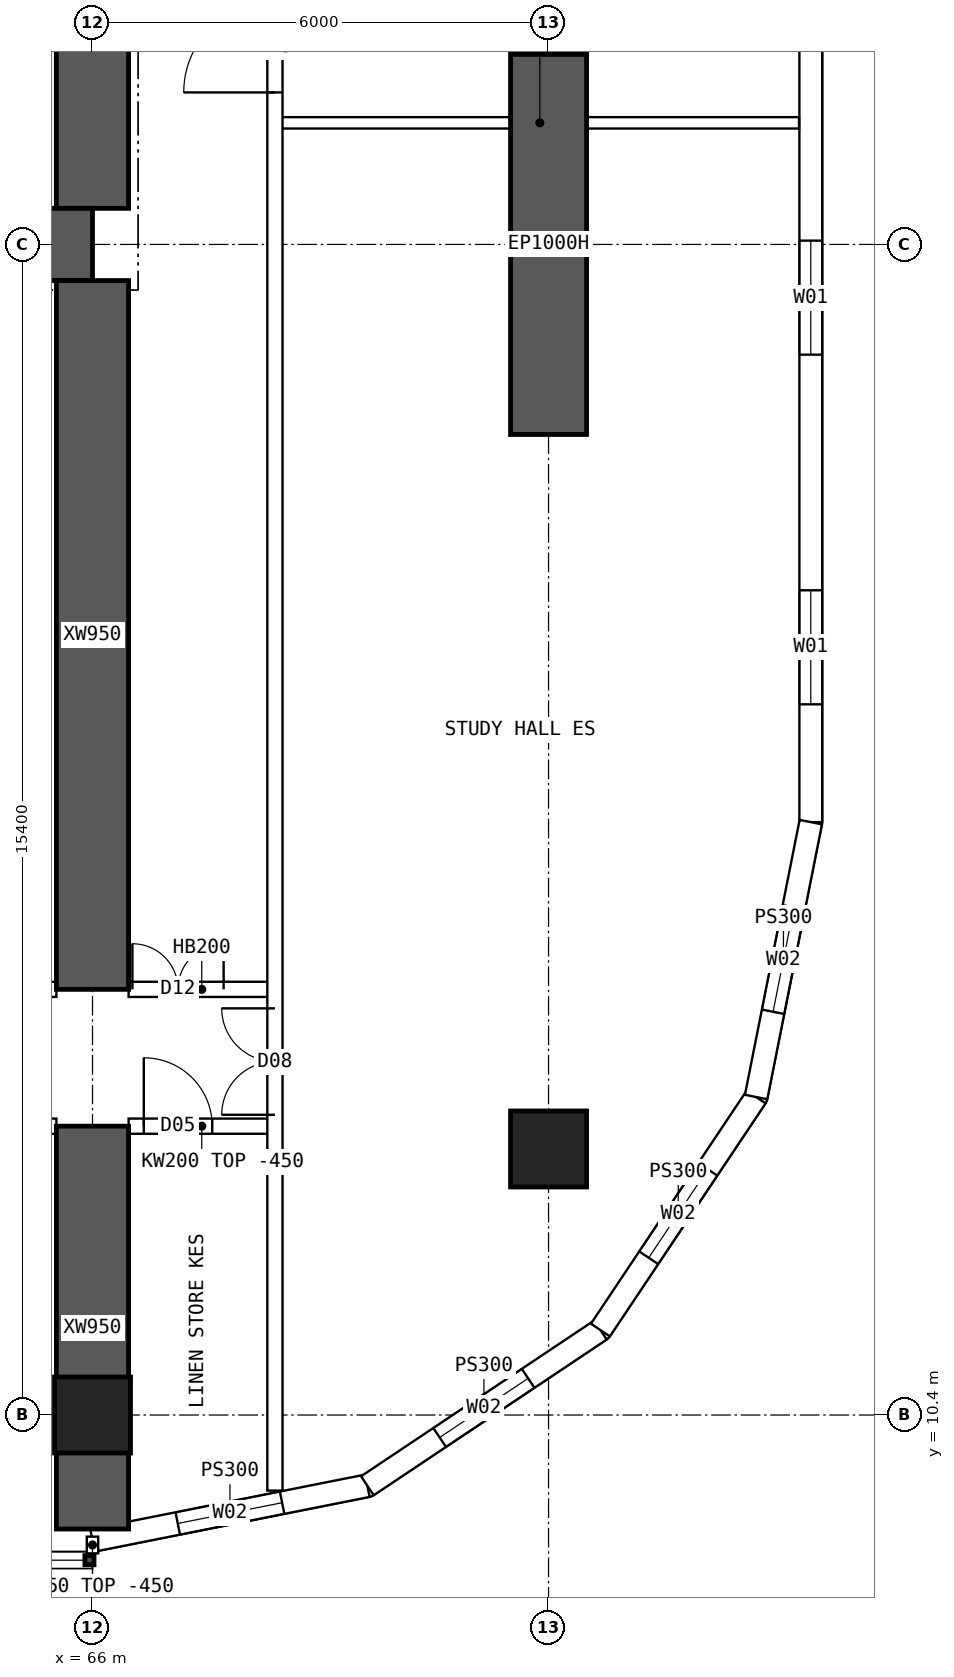
"""IFC4 building model, lengths in metres.
Left out: names, types, materials, properties, quantities, classifications, styles, units other than length and angle.
Written with IfcOpenShell. Run it as: python <this file> out.ifc"""

import sys

from ifc_helpers import new_model, si_unit, direction, frame, frame_2d, origin, origin_2d, place, context, subcontext, project, spatial, polyline, rectangle, hollow_rectangle, outline, extrude, element, fill, save


model = new_model("IFC4")
c1 = context("Model", 3, precision=1e-05, world=origin(), true_north=direction((0.0, 1.0)))
c2 = subcontext(c1, "Body", "Model", "MODEL_VIEW")
j1 = project(units=[si_unit("LENGTHUNIT", "METRE"), si_unit("PLANEANGLEUNIT", "RADIAN")], contexts=[c1])
p1 = place(None, origin())
s1 = spatial("IfcSite", under=j1, at=p1, CompositionType="ELEMENT")
p2 = place(p1, origin())
s2 = spatial("IfcBuilding", under=s1, at=p2, CompositionType="ELEMENT")
p3 = place(p2, frame((0.0, 0.0, 95.65)))
s3 = spatial("IfcBuildingStorey", under=s2, at=p3, CompositionType="ELEMENT", Elevation=95.65)
for number, where, z_axis, x_axis in (
    (1, (66.0, 10.4, 0.0), (0.0, 0.0, 1.0), (1.0, 0.0, 0.0)),
    (2, (72.0, 13.9, 0.0), (0.0, 0.0, 1.0), (1.0, 0.0, 0.0)),
):
    element("IfcColumn", number, at=place(p3, frame(where, z_axis=z_axis, x_axis=x_axis)), inside=s3, PredefinedType="COLUMN", context=c2, shape_type="SweptSolid", body=[
        extrude(hollow_rectangle(XDim=1.0, YDim=1.0, WallThickness=0.1, at=origin_2d()), origin(), (0.0, 0.0, 1.0), 3.75),
    ])
p4 = place(p3, frame((72.0, 23.3, 0.0), z_axis=(0.0, 0.0, 1.0), x_axis=(0.0, 1.0, 0.0)))
e3 = element("IfcWall", 3, at=p4, inside=s3, PredefinedType="SHEAR", context=c2, shape_type="SweptSolid", body=[
    extrude(rectangle(XDim=5.0, YDim=1.0, at=frame_2d((2.5, 0.0))), origin(), (0.0, 0.0, 1.0), 3.75),
])
p5 = place(p3, frame((18.0, 25.8, 0.0), z_axis=(0.0, 0.0, 1.0), x_axis=(1.0, 0.0, 0.0)))
e4 = element("IfcWall", 4, at=p5, inside=s3, PredefinedType="SHEAR", context=c2, shape_type="SweptSolid", body=[
    extrude(rectangle(XDim=48.0, YDim=0.95, at=frame_2d((24.0, 0.0))), origin(), (0.0, 0.0, 1.0), 3.75),
])
p6 = place(p3, frame((66.0, 26.275, 0.0), z_axis=(0.0, 0.0, 1.0), x_axis=(0.0, 1.0, 0.0)))
e5 = element("IfcWall", 5, at=p6, inside=s3, PredefinedType="SHEAR", context=c2, shape_type="SweptSolid", body=[
    extrude(rectangle(XDim=11.45, YDim=0.95, at=frame_2d((5.725, 0.0))), origin(), (0.0, 0.0, 1.0), 3.75),
])
p7 = place(p6, frame((5.025, 0.0, 0.0)))
e6 = element("IfcOpeningElement", 6, at=p7, cuts=e5, PredefinedType="OPENING", context=c2, shape_type="SweptSolid", body=[
    extrude(rectangle(XDim=1.2, YDim=2.1, at=frame_2d((0.6, 1.05))), frame((0.0, 0.485, 0.0), z_axis=(0.0, -1.0, 0.0), x_axis=(1.0, 0.0, 0.0)), (0.0, 0.0, 1.0), 0.97),
])
p8 = place(p3, frame((66.0, 8.9, 0.0), z_axis=(0.0, 0.0, 1.0), x_axis=(0.0, 1.0, 0.0)))
e7 = element("IfcWall", 7, at=p8, inside=s3, PredefinedType="SHEAR", context=c2, shape_type="SweptSolid", body=[
    extrude(rectangle(XDim=5.3, YDim=0.95, at=frame_2d((2.65, 0.0))), origin(), (0.0, 0.0, 1.0), 3.75),
])
p9 = place(p3, frame((66.0, 16.0, 0.0), z_axis=(0.0, 0.0, 1.0), x_axis=(0.0, 1.0, 0.0)))
e8 = element("IfcWall", 8, at=p9, inside=s3, PredefinedType="SHEAR", context=c2, shape_type="SweptSolid", body=[
    extrude(rectangle(XDim=9.325, YDim=0.95, at=frame_2d((4.663, 0.0))), origin(), (0.0, 0.0, 1.0), 3.75),
])
p10 = place(p3, frame((75.45, 18.2, 0.0), z_axis=(0.0, 0.0, 1.0), x_axis=(0.0, 1.0, 0.0)))
e9 = element("IfcWall", 9, at=p10, inside=s3, PredefinedType="SOLIDWALL", context=c2, shape_type="SweptSolid", body=[
    extrude(outline(polyline([(-0.015, -0.15), (27.615, -0.15), (27.585, 0.15), (0.015, 0.15), (-0.015, -0.15)])), origin(), (0.0, 0.0, 1.0), 3.3),
])
p11 = place(p10, frame((1.55, 0.0, 0.9)))
e10 = element("IfcOpeningElement", 10, at=p11, cuts=e9, PredefinedType="OPENING", context=c2, shape_type="SweptSolid", body=[
    extrude(rectangle(XDim=1.5, YDim=2.0, at=frame_2d((0.75, 1.0))), frame((0.0, 0.16, 0.0), z_axis=(0.0, -1.0, 0.0), x_axis=(1.0, 0.0, 0.0)), (0.0, 0.0, 1.0), 0.32),
])
p12 = place(p10, frame((6.15, 0.0, 0.9)))
e11 = element("IfcOpeningElement", 11, at=p12, cuts=e9, PredefinedType="OPENING", context=c2, shape_type="SweptSolid", body=[
    extrude(rectangle(XDim=1.5, YDim=2.0, at=frame_2d((0.75, 1.0))), frame((0.0, 0.16, 0.0), z_axis=(0.0, -1.0, 0.0), x_axis=(1.0, 0.0, 0.0)), (0.0, 0.0, 1.0), 0.32),
])
p13 = place(p10, frame((10.75, 0.0, 0.9)))
e12 = element("IfcOpeningElement", 12, at=p13, cuts=e9, PredefinedType="OPENING", context=c2, shape_type="SweptSolid", body=[
    extrude(rectangle(XDim=1.5, YDim=2.0, at=frame_2d((0.75, 1.0))), frame((0.0, 0.16, 0.0), z_axis=(0.0, -1.0, 0.0), x_axis=(1.0, 0.0, 0.0)), (0.0, 0.0, 1.0), 0.32),
])
p14 = place(p10, frame((15.35, 0.0, 0.9)))
e13 = element("IfcOpeningElement", 13, at=p14, cuts=e9, PredefinedType="OPENING", context=c2, shape_type="SweptSolid", body=[
    extrude(rectangle(XDim=1.5, YDim=2.0, at=frame_2d((0.75, 1.0))), frame((0.0, 0.16, 0.0), z_axis=(0.0, -1.0, 0.0), x_axis=(1.0, 0.0, 0.0)), (0.0, 0.0, 1.0), 0.32),
])
p15 = place(p10, frame((19.95, 0.0, 0.9)))
e14 = element("IfcOpeningElement", 14, at=p15, cuts=e9, PredefinedType="OPENING", context=c2, shape_type="SweptSolid", body=[
    extrude(rectangle(XDim=1.5, YDim=2.0, at=frame_2d((0.75, 1.0))), frame((0.0, 0.16, 0.0), z_axis=(0.0, -1.0, 0.0), x_axis=(1.0, 0.0, 0.0)), (0.0, 0.0, 1.0), 0.32),
])
p16 = place(p10, frame((24.55, 0.0, 0.9)))
e15 = element("IfcOpeningElement", 15, at=p16, cuts=e9, PredefinedType="OPENING", context=c2, shape_type="SweptSolid", body=[
    extrude(rectangle(XDim=1.5, YDim=2.0, at=frame_2d((0.75, 1.0))), frame((0.0, 0.16, 0.0), z_axis=(0.0, -1.0, 0.0), x_axis=(1.0, 0.0, 0.0)), (0.0, 0.0, 1.0), 0.32),
])
p17 = place(p3, frame((66.0, 8.75, 0.0), z_axis=(0.0, 0.0, 1.0), x_axis=(0.980791473772, 0.195059183267, 0.0)))
e16 = element("IfcWall", 16, at=p17, inside=s3, PredefinedType="SOLIDWALL", context=c2, shape_type="SweptSolid", body=[
    extrude(outline(polyline([(-0.03, -0.15), (3.717, -0.15), (3.657, 0.15), (0.03, 0.15), (-0.03, -0.15)])), origin(), (0.0, 0.0, 1.0), 3.3),
])
p18 = place(p17, frame((1.144, 0.0, 0.9)))
e17 = element("IfcOpeningElement", 17, at=p18, cuts=e16, PredefinedType="OPENING", context=c2, shape_type="SweptSolid", body=[
    extrude(rectangle(XDim=1.4, YDim=1.8, at=frame_2d((0.7, 0.9))), frame((0.0, 0.16, 0.0), z_axis=(0.0, -1.0, 0.0), x_axis=(1.0, 0.0, 0.0)), (0.0, 0.0, 1.0), 0.32),
])
p19 = place(p3, frame((69.616, 9.469, 0.0), z_axis=(0.0, 0.0, 1.0), x_axis=(0.831448786846, 0.555601399253, 0.0)))
e18 = element("IfcWall", 18, at=p19, inside=s3, PredefinedType="SOLIDWALL", context=c2, shape_type="SweptSolid", body=[
    extrude(outline(polyline([(-0.03, -0.15), (3.717, -0.15), (3.657, 0.15), (0.03, 0.15), (-0.03, -0.15)])), origin(), (0.0, 0.0, 1.0), 3.3),
])
p20 = place(p19, frame((1.144, 0.0, 0.9)))
e19 = element("IfcOpeningElement", 19, at=p20, cuts=e18, PredefinedType="OPENING", context=c2, shape_type="SweptSolid", body=[
    extrude(rectangle(XDim=1.4, YDim=1.8, at=frame_2d((0.7, 0.9))), frame((0.0, 0.16, 0.0), z_axis=(0.0, -1.0, 0.0), x_axis=(1.0, 0.0, 0.0)), (0.0, 0.0, 1.0), 0.32),
])
p21 = place(p3, frame((72.682, 11.518, 0.0), z_axis=(0.0, 0.0, 1.0), x_axis=(0.555601399253, 0.831448786846, 0.0)))
e20 = element("IfcWall", 20, at=p21, inside=s3, PredefinedType="SOLIDWALL", context=c2, shape_type="SweptSolid", body=[
    extrude(outline(polyline([(-0.03, -0.15), (3.717, -0.15), (3.657, 0.15), (0.03, 0.15), (-0.03, -0.15)])), origin(), (0.0, 0.0, 1.0), 3.3),
])
p22 = place(p21, frame((1.144, 0.0, 0.9)))
e21 = element("IfcOpeningElement", 21, at=p22, cuts=e20, PredefinedType="OPENING", context=c2, shape_type="SweptSolid", body=[
    extrude(rectangle(XDim=1.4, YDim=1.8, at=frame_2d((0.7, 0.9))), frame((0.0, 0.16, 0.0), z_axis=(0.0, -1.0, 0.0), x_axis=(1.0, 0.0, 0.0)), (0.0, 0.0, 1.0), 0.32),
])
p23 = place(p3, frame((74.731, 14.583, 0.0), z_axis=(0.0, 0.0, 1.0), x_axis=(0.195059183267, 0.980791473772, 0.0)))
e22 = element("IfcWall", 22, at=p23, inside=s3, PredefinedType="SOLIDWALL", context=c2, shape_type="SweptSolid", body=[
    extrude(outline(polyline([(-0.03, -0.15), (3.702, -0.15), (3.672, 0.15), (0.03, 0.15), (-0.03, -0.15)])), origin(), (0.0, 0.0, 1.0), 3.3),
])
p24 = place(p23, frame((1.144, 0.0, 0.9)))
e23 = element("IfcOpeningElement", 23, at=p24, cuts=e22, PredefinedType="OPENING", context=c2, shape_type="SweptSolid", body=[
    extrude(rectangle(XDim=1.4, YDim=1.8, at=frame_2d((0.7, 0.9))), frame((0.0, 0.16, 0.0), z_axis=(0.0, -1.0, 0.0), x_axis=(1.0, 0.0, 0.0)), (0.0, 0.0, 1.0), 0.32),
])
p25 = place(p3, frame((60.475, 14.2, 0.0), z_axis=(0.0, 0.0, 1.0), x_axis=(1.0, 0.0, 0.0)))
e24 = element("IfcWall", 24, at=p25, inside=s3, PredefinedType="SOLIDWALL", context=c2, shape_type="SweptSolid", body=[
    extrude(outline(polyline([(0.0, 0.0), (5.05, 0.0), (5.05, 2.9), (0.0, 2.9), (0.0, 0.0)])), frame((0.0, 0.1, 0.0), z_axis=(0.0, -1.0, 0.0), x_axis=(1.0, 0.0, 0.0)), (0.0, 0.0, 1.0), 0.2),
])
p26 = place(p25, frame((0.1, 0.0, 0.0)))
e25 = element("IfcOpeningElement", 25, at=p26, cuts=e24, PredefinedType="OPENING", context=c2, shape_type="SweptSolid", body=[
    extrude(rectangle(XDim=0.9, YDim=2.1, at=frame_2d((0.45, 1.05))), frame((0.0, 0.11, 0.0), z_axis=(0.0, -1.0, 0.0), x_axis=(1.0, 0.0, 0.0)), (0.0, 0.0, 1.0), 0.22),
])
p27 = place(p25, frame((4.05, 0.0, 0.0)))
e26 = element("IfcOpeningElement", 26, at=p27, cuts=e24, PredefinedType="OPENING", context=c2, shape_type="SweptSolid", body=[
    extrude(rectangle(XDim=0.9, YDim=2.1, at=frame_2d((0.45, 1.05))), frame((0.0, 0.11, 0.0), z_axis=(0.0, -1.0, 0.0), x_axis=(1.0, 0.0, 0.0)), (0.0, 0.0, 1.0), 0.22),
])
p28 = place(p3, frame((60.475, 16.0, 0.0), z_axis=(0.0, 0.0, 1.0), x_axis=(1.0, 0.0, 0.0)))
e27 = element("IfcWall", 27, at=p28, inside=s3, PredefinedType="SOLIDWALL", context=c2, shape_type="SweptSolid", body=[
    extrude(rectangle(XDim=5.05, YDim=0.2, at=frame_2d((2.525, 0.0))), origin(), (0.0, 0.0, 1.0), 3.3),
])
p29 = place(p28, frame((0.15, 0.0, 0.0)))
e28 = element("IfcOpeningElement", 28, at=p29, cuts=e27, PredefinedType="OPENING", context=c2, shape_type="SweptSolid", body=[
    extrude(rectangle(XDim=0.9, YDim=2.1, at=frame_2d((0.45, 1.05))), frame((0.0, 0.11, 0.0), z_axis=(0.0, -1.0, 0.0), x_axis=(1.0, 0.0, 0.0)), (0.0, 0.0, 1.0), 0.22),
])
p30 = place(p28, frame((3.185, 0.0, 0.0)))
e29 = element("IfcOpeningElement", 29, at=p30, cuts=e27, PredefinedType="OPENING", context=c2, shape_type="SweptSolid", body=[
    extrude(rectangle(XDim=0.9, YDim=2.1, at=frame_2d((0.45, 1.05))), frame((0.0, 0.11, 0.0), z_axis=(0.0, -1.0, 0.0), x_axis=(1.0, 0.0, 0.0)), (0.0, 0.0, 1.0), 0.22),
])
p31 = place(p3, frame((66.475, 14.2, 0.0), z_axis=(0.0, 0.0, 1.0), x_axis=(1.0, 0.0, 0.0)))
e30 = element("IfcWall", 30, at=p31, inside=s3, PredefinedType="SOLIDWALL", context=c2, shape_type="SweptSolid", body=[
    extrude(rectangle(XDim=1.925, YDim=0.2, at=frame_2d((0.962, 0.0))), origin(), (0.0, 0.0, 1.0), 3.3),
])
p32 = place(p31, frame((0.2, 0.0, 0.0)))
e31 = element("IfcOpeningElement", 31, at=p32, cuts=e30, PredefinedType="OPENING", context=c2, shape_type="SweptSolid", body=[
    extrude(rectangle(XDim=0.9, YDim=2.1, at=frame_2d((0.45, 1.05))), frame((0.0, 0.11, 0.0), z_axis=(0.0, -1.0, 0.0), x_axis=(1.0, 0.0, 0.0)), (0.0, 0.0, 1.0), 0.22),
])
p33 = place(p3, frame((66.475, 16.0, 0.0), z_axis=(0.0, 0.0, 1.0), x_axis=(1.0, 0.0, 0.0)))
e32 = element("IfcWall", 32, at=p33, inside=s3, PredefinedType="SOLIDWALL", context=c2, shape_type="SweptSolid", body=[
    extrude(rectangle(XDim=1.925, YDim=0.2, at=frame_2d((0.962, 0.0))), origin(), (0.0, 0.0, 1.0), 3.3),
])
p34 = place(p33, frame((0.05, 0.0, 0.0)))
e33 = element("IfcOpeningElement", 33, at=p34, cuts=e32, PredefinedType="OPENING", context=c2, shape_type="SweptSolid", body=[
    extrude(rectangle(XDim=1.2, YDim=2.1, at=frame_2d((0.6, 1.05))), frame((0.0, 0.11, 0.0), z_axis=(0.0, -1.0, 0.0), x_axis=(1.0, 0.0, 0.0)), (0.0, 0.0, 1.0), 0.22),
])
p35 = place(p3, frame((68.4, 9.405, 0.0), z_axis=(0.0, 0.0, 1.0), x_axis=(0.0, 1.0, 0.0)))
e34 = element("IfcWall", 34, at=p35, inside=s3, PredefinedType="SOLIDWALL", context=c2, shape_type="SweptSolid", body=[
    extrude(rectangle(XDim=45.189, YDim=0.2, at=frame_2d((22.595, 0.0))), origin(), (0.0, 0.0, 1.0), 3.3),
])
p36 = place(p35, frame((18.395, 0.0, 0.0)))
e35 = element("IfcOpeningElement", 35, at=p36, cuts=e34, PredefinedType="OPENING", context=c2, shape_type="SweptSolid", body=[
    extrude(rectangle(XDim=1.2, YDim=2.1, at=frame_2d((0.6, 1.05))), frame((0.0, 0.11, 0.0), z_axis=(0.0, -1.0, 0.0), x_axis=(1.0, 0.0, 0.0)), (0.0, 0.0, 1.0), 0.22),
])
p37 = place(p35, frame((30.195, 0.0, 0.0)))
e36 = element("IfcOpeningElement", 36, at=p37, cuts=e34, PredefinedType="OPENING", context=c2, shape_type="SweptSolid", body=[
    extrude(rectangle(XDim=1.2, YDim=2.1, at=frame_2d((0.6, 1.05))), frame((0.0, 0.11, 0.0), z_axis=(0.0, -1.0, 0.0), x_axis=(1.0, 0.0, 0.0)), (0.0, 0.0, 1.0), 0.22),
])
p38 = place(p35, frame((4.945, 0.0, 0.0)))
e37 = element("IfcOpeningElement", 37, at=p38, cuts=e34, PredefinedType="OPENING", context=c2, shape_type="SweptSolid", body=[
    extrude(rectangle(XDim=1.4, YDim=2.1, at=frame_2d((0.7, 1.05))), frame((0.0, 0.11, 0.0), z_axis=(0.0, -1.0, 0.0), x_axis=(1.0, 0.0, 0.0)), (0.0, 0.0, 1.0), 0.22),
])
p39 = place(p35, frame((38.745, 0.0, 0.0)))
e38 = element("IfcOpeningElement", 38, at=p39, cuts=e34, PredefinedType="OPENING", context=c2, shape_type="SweptSolid", body=[
    extrude(rectangle(XDim=1.4, YDim=2.1, at=frame_2d((0.7, 1.05))), frame((0.0, 0.11, 0.0), z_axis=(0.0, -1.0, 0.0), x_axis=(1.0, 0.0, 0.0)), (0.0, 0.0, 1.0), 0.22),
])
p40 = place(p3, frame((68.475, 27.4, 0.0), z_axis=(0.0, 0.0, 1.0), x_axis=(1.0, 0.0, 0.0)))
e39 = element("IfcWall", 39, at=p40, inside=s3, PredefinedType="PARTITIONING", context=c2, shape_type="SweptSolid", body=[
    extrude(rectangle(XDim=6.82, YDim=0.15, at=frame_2d((3.41, 0.0))), origin(), (0.0, 0.0, 1.0), 3.3),
])
p41 = place(p3, frame((66.0, 8.8, 0.0), z_axis=(0.0, 0.0, 1.0), x_axis=(0.0, -1.0, 0.0)))
e40 = element("IfcWall", 40, at=p41, inside=s3, PredefinedType="PARTITIONING", context=c2, shape_type="SweptSolid", body=[
    extrude(rectangle(XDim=0.22, YDim=0.15, at=frame_2d((0.11, 0.0))), origin(), (0.0, 0.0, 1.0), 3.3),
])
p42 = place(p11, origin())
e41 = element("IfcWindow", 41, at=p42, inside=s3, PartitioningType="SINGLE_PANEL", PredefinedType="WINDOW", context=c2, shape_type="SweptSolid", body=[
    extrude(rectangle(XDim=1.5, YDim=2.0, at=frame_2d((0.75, 1.0))), frame((0.0, 0.03, 0.0), z_axis=(0.0, -1.0, 0.0), x_axis=(1.0, 0.0, 0.0)), (0.0, 0.0, 1.0), 0.06),
])
fill(e10, e41)
p43 = place(p12, origin())
e42 = element("IfcWindow", 42, at=p43, inside=s3, PartitioningType="SINGLE_PANEL", PredefinedType="WINDOW", context=c2, shape_type="SweptSolid", body=[
    extrude(rectangle(XDim=1.5, YDim=2.0, at=frame_2d((0.75, 1.0))), frame((0.0, 0.03, 0.0), z_axis=(0.0, -1.0, 0.0), x_axis=(1.0, 0.0, 0.0)), (0.0, 0.0, 1.0), 0.06),
])
fill(e11, e42)
p44 = place(p18, origin())
e43 = element("IfcWindow", 43, at=p44, inside=s3, PartitioningType="SINGLE_PANEL", PredefinedType="WINDOW", context=c2, shape_type="SweptSolid", body=[
    extrude(rectangle(XDim=1.4, YDim=1.8, at=frame_2d((0.7, 0.9))), frame((0.0, 0.03, 0.0), z_axis=(0.0, -1.0, 0.0), x_axis=(1.0, 0.0, 0.0)), (0.0, 0.0, 1.0), 0.06),
])
fill(e17, e43)
p45 = place(p20, origin())
e44 = element("IfcWindow", 44, at=p45, inside=s3, PartitioningType="SINGLE_PANEL", PredefinedType="WINDOW", context=c2, shape_type="SweptSolid", body=[
    extrude(rectangle(XDim=1.4, YDim=1.8, at=frame_2d((0.7, 0.9))), frame((0.0, 0.03, 0.0), z_axis=(0.0, -1.0, 0.0), x_axis=(1.0, 0.0, 0.0)), (0.0, 0.0, 1.0), 0.06),
])
fill(e19, e44)
p46 = place(p22, origin())
e45 = element("IfcWindow", 45, at=p46, inside=s3, PartitioningType="SINGLE_PANEL", PredefinedType="WINDOW", context=c2, shape_type="SweptSolid", body=[
    extrude(rectangle(XDim=1.4, YDim=1.8, at=frame_2d((0.7, 0.9))), frame((0.0, 0.03, 0.0), z_axis=(0.0, -1.0, 0.0), x_axis=(1.0, 0.0, 0.0)), (0.0, 0.0, 1.0), 0.06),
])
fill(e21, e45)
p47 = place(p24, origin())
e46 = element("IfcWindow", 46, at=p47, inside=s3, PartitioningType="SINGLE_PANEL", PredefinedType="WINDOW", context=c2, shape_type="SweptSolid", body=[
    extrude(rectangle(XDim=1.4, YDim=1.8, at=frame_2d((0.7, 0.9))), frame((0.0, 0.03, 0.0), z_axis=(0.0, -1.0, 0.0), x_axis=(1.0, 0.0, 0.0)), (0.0, 0.0, 1.0), 0.06),
])
fill(e23, e46)
p48 = place(p34, origin())
e47 = element("IfcDoor", 47, at=p48, inside=s3, OperationType="DOUBLE_DOOR_SINGLE_SWING", PredefinedType="DOOR", context=c2, shape_type="SweptSolid", body=[
    extrude(rectangle(XDim=1.2, YDim=2.1, at=frame_2d((0.6, 1.05))), frame((0.0, 0.025, 0.0), z_axis=(0.0, -1.0, 0.0), x_axis=(1.0, 0.0, 0.0)), (0.0, 0.0, 1.0), 0.05),
])
fill(e33, e47)
p49 = place(p36, origin())
e48 = element("IfcDoor", 48, at=p49, inside=s3, OperationType="SINGLE_SWING_LEFT", PredefinedType="DOOR", context=c2, shape_type="SweptSolid", body=[
    extrude(rectangle(XDim=1.2, YDim=2.1, at=frame_2d((0.6, 1.05))), frame((0.0, 0.025, 0.0), z_axis=(0.0, -1.0, 0.0), x_axis=(1.0, 0.0, 0.0)), (0.0, 0.0, 1.0), 0.05),
])
fill(e35, e48)
p50 = place(p38, origin())
e49 = element("IfcDoor", 49, at=p50, inside=s3, OperationType="DOUBLE_DOOR_SINGLE_SWING", PredefinedType="DOOR", context=c2, shape_type="SweptSolid", body=[
    extrude(rectangle(XDim=1.4, YDim=2.1, at=frame_2d((0.7, 1.05))), frame((0.0, 0.025, 0.0), z_axis=(0.0, -1.0, 0.0), x_axis=(1.0, 0.0, 0.0)), (0.0, 0.0, 1.0), 0.05),
])
fill(e37, e49)
p51 = place(p32, origin())
e50 = element("IfcDoor", 50, at=p51, inside=s3, OperationType="SINGLE_SWING_LEFT", PredefinedType="DOOR", context=c2, shape_type="SweptSolid", body=[
    extrude(rectangle(XDim=0.9, YDim=2.1, at=frame_2d((0.45, 1.05))), frame((0.0, 0.025, 0.0), z_axis=(0.0, -1.0, 0.0), x_axis=(1.0, 0.0, 0.0)), (0.0, 0.0, 1.0), 0.05),
])
fill(e31, e50)
save(model, sys.argv[1])
